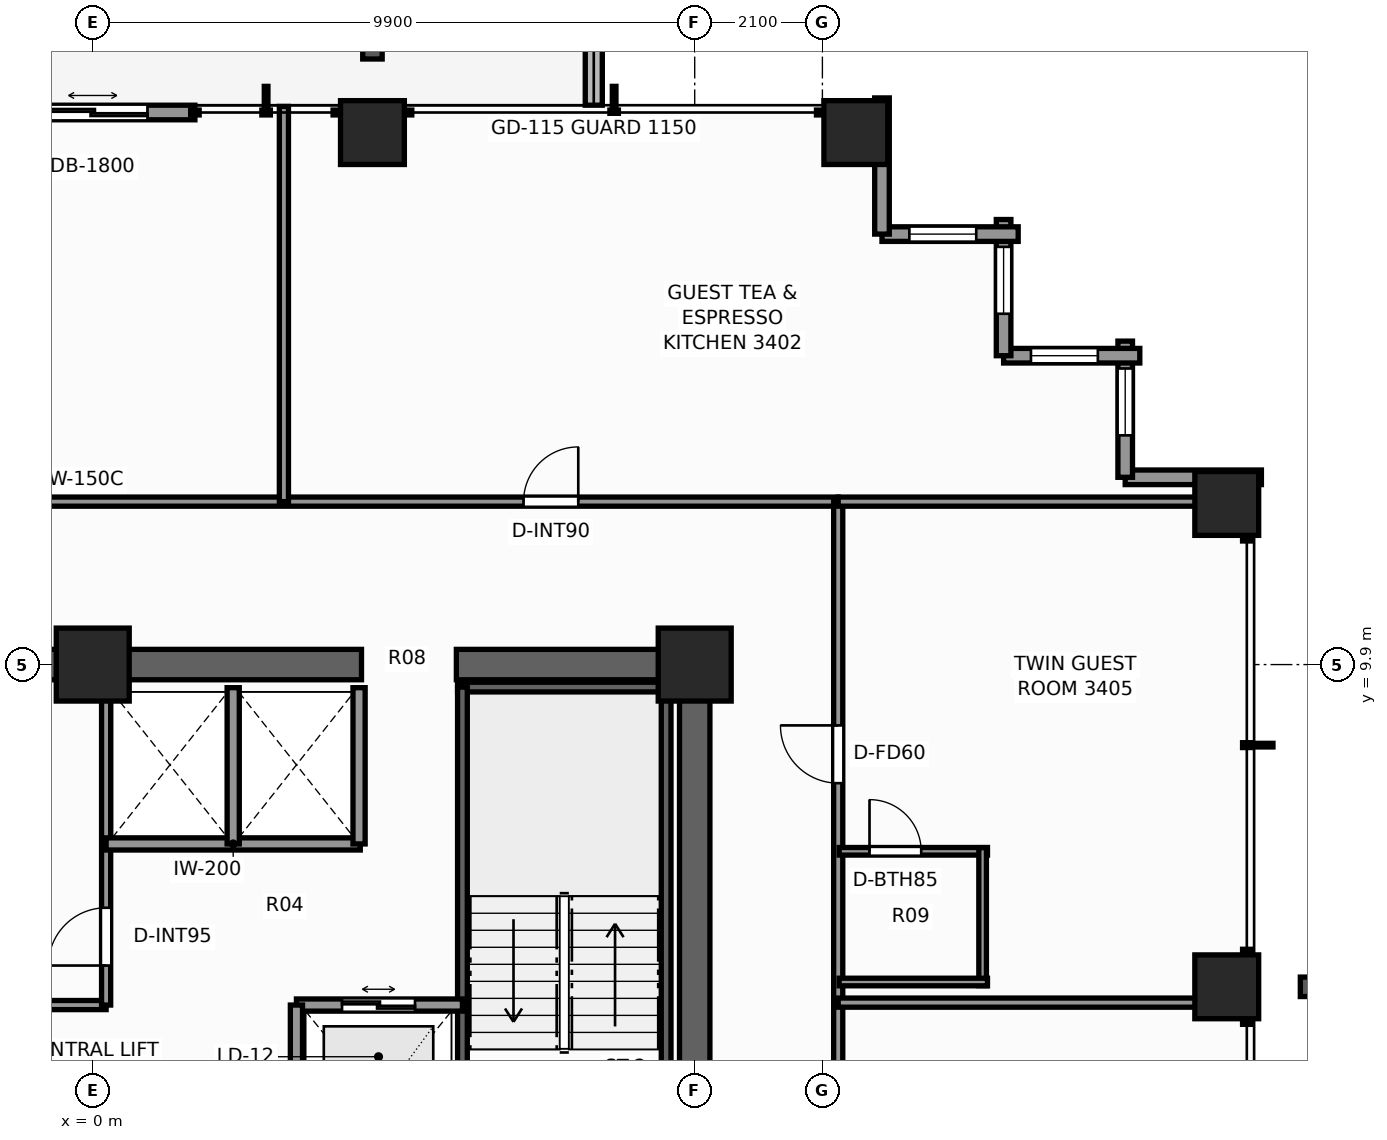
"""IFC4 building model, lengths in metres.
Left out: names, types, materials, properties, quantities, classifications, styles, units other than length and angle.
Written with IfcOpenShell. Run it as: python <this file> out.ifc"""

import sys

from ifc_helpers import new_model, si_unit, direction, frame, frame_2d, origin, origin_2d, place, context, subcontext, project, spatial, rectangle, extrude, element, fill, save


model = new_model("IFC4")
c1 = context("Model", 3, precision=1e-05, world=origin(), true_north=direction((0.0, 1.0)))
c2 = subcontext(c1, "Body", "Model", "MODEL_VIEW")
j1 = project(units=[si_unit("LENGTHUNIT", "METRE"), si_unit("PLANEANGLEUNIT", "RADIAN")], contexts=[c1])
p1 = place(None, origin())
s1 = spatial("IfcSite", under=j1, at=p1, CompositionType="ELEMENT")
p2 = place(p1, origin())
s2 = spatial("IfcBuilding", under=s1, at=p2, CompositionType="ELEMENT")
p3 = place(p2, frame((0.0, 0.0, 118.4)))
s3 = spatial("IfcBuildingStorey", under=s2, at=p3, CompositionType="ELEMENT", Elevation=118.4)
p4 = place(p3, frame((-10.15, 9.9, 0.0), z_axis=(0.0, 0.0, 1.0), x_axis=(1.0, 0.0, 0.0)))
e1 = element("IfcWall", 1, at=p4, inside=s3, PredefinedType="SHEAR", context=c2, shape_type="SweptSolid", body=[
    extrude(rectangle(XDim=14.57, YDim=0.5, at=frame_2d((7.285, 0.0))), origin(), (0.0, 0.0, 1.0), 3.3),
])
p5 = place(p3, frame((5.98, 9.9, 0.0), z_axis=(0.0, 0.0, 1.0), x_axis=(1.0, 0.0, 0.0)))
e2 = element("IfcWall", 2, at=p5, inside=s3, PredefinedType="SHEAR", context=c2, shape_type="SweptSolid", body=[
    extrude(rectangle(XDim=4.17, YDim=0.5, at=frame_2d((2.085, 0.0))), origin(), (0.0, 0.0, 1.0), 3.3),
])
p6 = place(p3, frame((9.9, -3.7, 0.0), z_axis=(0.0, 0.0, 1.0), x_axis=(0.0, 1.0, 0.0)))
e3 = element("IfcWall", 3, at=p6, inside=s3, PredefinedType="SHEAR", context=c2, shape_type="SweptSolid", body=[
    extrude(rectangle(XDim=13.35, YDim=0.5, at=frame_2d((6.675, 0.0))), origin(), (0.0, 0.0, 1.0), 3.3),
])
p7 = place(p6, frame((0.35, 0.0, 0.0)))
e4 = element("IfcOpeningElement", 4, at=p7, cuts=e3, PredefinedType="OPENING", context=c2, shape_type="SweptSolid", body=[
    extrude(rectangle(XDim=1.1, YDim=2.2, at=frame_2d((0.55, 1.1))), frame((0.0, 0.26, 0.0), z_axis=(0.0, -1.0, 0.0), x_axis=(1.0, 0.0, 0.0)), (0.0, 0.0, 1.0), 0.52),
])
for number, where, z_axis, x_axis in (
    (5, (9.9, 9.9, 0.0), (0.0, 0.0, 1.0), (1.0, 0.0, 0.0)),
    (6, (0.0, 9.9, 0.0), (0.0, 0.0, 1.0), (1.0, 0.0, 0.0)),
):
    element("IfcColumn", number, at=place(p3, frame(where, z_axis=z_axis, x_axis=x_axis)), inside=s3, PredefinedType="COLUMN", context=c2, shape_type="SweptSolid", body=[
        extrude(rectangle(XDim=1.2, YDim=1.2, at=origin_2d()), origin(), (0.0, 0.0, 1.0), 3.3),
    ])
for number, where, z_axis, x_axis in (
    (7, (4.6, 18.65, 0.0), (0.0, 0.0, 1.0), (1.0, 0.0, 0.0)),
    (8, (12.55, 18.65, 0.0), (0.0, 0.0, 1.0), (1.0, 0.0, 0.0)),
    (9, (18.65, 4.6, 0.0), (0.0, 0.0, 1.0), (1.0, 0.0, 0.0)),
    (10, (18.65, 12.55, 0.0), (0.0, 0.0, 1.0), (1.0, 0.0, 0.0)),
):
    element("IfcColumn", number, at=place(p3, frame(where, z_axis=z_axis, x_axis=x_axis)), inside=s3, PredefinedType="COLUMN", context=c2, shape_type="SweptSolid", body=[
        extrude(rectangle(XDim=1.05, YDim=1.05, at=origin_2d()), origin(), (0.0, 0.0, 1.0), 3.3),
    ])
p8 = place(p3, frame((8.24, 19.1, -0.04), z_axis=(0.0, 0.0, 1.0), x_axis=(0.0, 1.0, 0.0)))
e11 = element("IfcWall", 11, at=p8, inside=s3, PredefinedType="PARAPET", context=c2, shape_type="SweptSolid", body=[
    extrude(rectangle(XDim=1.705, YDim=0.28, at=frame_2d((0.853, 0.0))), origin(), (0.0, 0.0, 1.0), 0.42),
])
p9 = place(p3, frame((16.98, 12.98, 0.0), z_axis=(0.0, 0.0, 1.0), x_axis=(1.0, 0.0, 0.0)))
e12 = element("IfcWall", 12, at=p9, inside=s3, PredefinedType="STANDARD", context=c2, shape_type="SweptSolid", body=[
    extrude(rectangle(XDim=2.24, YDim=0.24, at=frame_2d((1.12, 0.0))), origin(), (0.0, 0.0, 1.0), 2.459),
])
p10 = place(p3, frame((16.98, 15.22, 0.0), z_axis=(0.0, 0.0, 1.0), x_axis=(0.0, -1.0, 0.0)))
e13 = element("IfcWall", 13, at=p10, inside=s3, PredefinedType="STANDARD", context=c2, shape_type="SweptSolid", body=[
    extrude(rectangle(XDim=2.24, YDim=0.24, at=frame_2d((1.12, 0.0))), origin(), (0.0, 0.0, 1.0), 2.459),
])
p11 = place(p10, frame((0.45, 0.0, 0.65)))
e14 = element("IfcOpeningElement", 14, at=p11, cuts=e13, PredefinedType="OPENING", context=c2, shape_type="SweptSolid", body=[
    extrude(rectangle(XDim=1.1, YDim=1.45, at=frame_2d((0.55, 0.725))), frame((0.0, 0.13, 0.0), z_axis=(0.0, -1.0, 0.0), x_axis=(1.0, 0.0, 0.0)), (0.0, 0.0, 1.0), 0.26),
])
p12 = place(p3, frame((14.98, 14.98, 0.0), z_axis=(0.0, 0.0, 1.0), x_axis=(1.0, 0.0, 0.0)))
e15 = element("IfcWall", 15, at=p12, inside=s3, PredefinedType="STANDARD", context=c2, shape_type="SweptSolid", body=[
    extrude(rectangle(XDim=2.24, YDim=0.24, at=frame_2d((1.12, 0.0))), origin(), (0.0, 0.0, 1.0), 2.459),
])
p13 = place(p12, frame((0.45, 0.0, 0.65)))
e16 = element("IfcOpeningElement", 16, at=p13, cuts=e15, PredefinedType="OPENING", context=c2, shape_type="SweptSolid", body=[
    extrude(rectangle(XDim=1.1, YDim=1.45, at=frame_2d((0.55, 0.725))), frame((0.0, 0.13, 0.0), z_axis=(0.0, -1.0, 0.0), x_axis=(1.0, 0.0, 0.0)), (0.0, 0.0, 1.0), 0.26),
])
p14 = place(p3, frame((14.98, 17.22, 0.0), z_axis=(0.0, 0.0, 1.0), x_axis=(0.0, -1.0, 0.0)))
e17 = element("IfcWall", 17, at=p14, inside=s3, PredefinedType="STANDARD", context=c2, shape_type="SweptSolid", body=[
    extrude(rectangle(XDim=2.24, YDim=0.24, at=frame_2d((1.12, 0.0))), origin(), (0.0, 0.0, 1.0), 2.459),
])
p15 = place(p14, frame((0.45, 0.0, 0.65)))
e18 = element("IfcOpeningElement", 18, at=p15, cuts=e17, PredefinedType="OPENING", context=c2, shape_type="SweptSolid", body=[
    extrude(rectangle(XDim=1.1, YDim=1.45, at=frame_2d((0.55, 0.725))), frame((0.0, 0.13, 0.0), z_axis=(0.0, -1.0, 0.0), x_axis=(1.0, 0.0, 0.0)), (0.0, 0.0, 1.0), 0.26),
])
p16 = place(p3, frame((12.98, 16.98, 0.0), z_axis=(0.0, 0.0, 1.0), x_axis=(1.0, 0.0, 0.0)))
e19 = element("IfcWall", 19, at=p16, inside=s3, PredefinedType="STANDARD", context=c2, shape_type="SweptSolid", body=[
    extrude(rectangle(XDim=2.24, YDim=0.24, at=frame_2d((1.12, 0.0))), origin(), (0.0, 0.0, 1.0), 2.459),
])
p17 = place(p16, frame((0.45, 0.0, 0.65)))
e20 = element("IfcOpeningElement", 20, at=p17, cuts=e19, PredefinedType="OPENING", context=c2, shape_type="SweptSolid", body=[
    extrude(rectangle(XDim=1.1, YDim=1.45, at=frame_2d((0.55, 0.725))), frame((0.0, 0.13, 0.0), z_axis=(0.0, -1.0, 0.0), x_axis=(1.0, 0.0, 0.0)), (0.0, 0.0, 1.0), 0.26),
])
p18 = place(p3, frame((12.98, 19.22, 0.0), z_axis=(0.0, 0.0, 1.0), x_axis=(0.0, -1.0, 0.0)))
e21 = element("IfcWall", 21, at=p18, inside=s3, PredefinedType="STANDARD", context=c2, shape_type="SweptSolid", body=[
    extrude(rectangle(XDim=2.24, YDim=0.24, at=frame_2d((1.12, 0.0))), origin(), (0.0, 0.0, 1.0), 2.459),
])
p19 = place(p3, frame((-1.68, 18.98, 0.0), z_axis=(0.0, 0.0, 1.0), x_axis=(1.0, 0.0, 0.0)))
e22 = element("IfcWall", 22, at=p19, inside=s3, PredefinedType="STANDARD", context=c2, shape_type="SweptSolid", body=[
    extrude(rectangle(XDim=3.36, YDim=0.24, at=frame_2d((1.68, 0.0))), origin(), (0.0, 0.0, 1.0), 3.08),
])
p20 = place(p19, frame((0.78, 0.0, 0.0)))
e23 = element("IfcOpeningElement", 23, at=p20, cuts=e22, PredefinedType="OPENING", context=c2, shape_type="SweptSolid", body=[
    extrude(rectangle(XDim=1.8, YDim=2.2, at=frame_2d((0.9, 1.1))), frame((0.0, 0.13, 0.0), z_axis=(0.0, -1.0, 0.0), x_axis=(1.0, 0.0, 0.0)), (0.0, 0.0, 1.0), 0.26),
])
p21 = place(p3, frame((6.0, 9.53, 0.0), z_axis=(0.0, 0.0, 1.0), x_axis=(1.0, 0.0, 0.0)))
e24 = element("IfcWall", 24, at=p21, inside=s3, PredefinedType="SHEAR", context=c2, shape_type="SweptSolid", body=[
    extrude(rectangle(XDim=3.52, YDim=0.16, at=frame_2d((1.76, 0.0))), origin(), (0.0, 0.0, 1.0), 3.3),
])
for number, where, z_axis, x_axis in (
    (25, (6.08, 1.97, 0.0), (0.0, 0.0, 1.0), (0.0, 1.0, 0.0)),
    (26, (9.43, 1.97, 0.0), (0.0, 0.0, 1.0), (0.0, 1.0, 0.0)),
):
    element("IfcWall", number, at=place(p3, frame(where, z_axis=z_axis, x_axis=x_axis)), inside=s3, PredefinedType="SHEAR", context=c2, shape_type="SweptSolid", body=[
        extrude(rectangle(XDim=7.56, YDim=0.16, at=frame_2d((3.78, 0.0))), origin(), (0.0, 0.0, 1.0), 3.3),
    ])
p22 = place(p3, frame((3.35, 4.3, 0.0), z_axis=(0.0, 0.0, 1.0), x_axis=(1.0, 0.0, 0.0)))
e27 = element("IfcWall", 27, at=p22, inside=s3, PredefinedType="SOLIDWALL", context=c2, shape_type="SweptSolid", body=[
    extrude(rectangle(XDim=2.73, YDim=0.2, at=frame_2d((1.365, 0.0))), origin(), (0.0, 0.0, 1.0), 3.08),
])
p23 = place(p22, frame((0.75, 0.0, 0.0)))
e28 = element("IfcOpeningElement", 28, at=p23, cuts=e27, PredefinedType="OPENING", context=c2, shape_type="SweptSolid", body=[
    extrude(rectangle(XDim=1.2, YDim=2.25, at=frame_2d((0.6, 1.125))), frame((0.0, 0.11, 0.0), z_axis=(0.0, -1.0, 0.0), x_axis=(1.0, 0.0, 0.0)), (0.0, 0.0, 1.0), 0.22),
])
p24 = place(p3, frame((3.35, 1.1, 0.0), z_axis=(0.0, 0.0, 1.0), x_axis=(0.0, 1.0, 0.0)))
e29 = element("IfcWall", 29, at=p24, inside=s3, PredefinedType="SOLIDWALL", context=c2, shape_type="SweptSolid", body=[
    extrude(rectangle(XDim=3.2, YDim=0.2, at=frame_2d((1.6, 0.0))), origin(), (0.0, 0.0, 1.0), 2.715),
])
p25 = place(p3, frame((-6.08, 4.3, 0.0), z_axis=(0.0, 0.0, 1.0), x_axis=(1.0, 0.0, 0.0)))
e30 = element("IfcWall", 30, at=p25, inside=s3, PredefinedType="PARTITIONING", context=c2, shape_type="SweptSolid", body=[
    extrude(rectangle(XDim=6.3, YDim=0.15, at=frame_2d((3.15, 0.0))), origin(), (0.0, 0.0, 1.0), 3.08),
])
p26 = place(p3, frame((0.22, 4.3, 0.0), z_axis=(0.0, 0.0, 1.0), x_axis=(0.0, 1.0, 0.0)))
e31 = element("IfcWall", 31, at=p26, inside=s3, PredefinedType="PARTITIONING", context=c2, shape_type="SweptSolid", body=[
    extrude(rectangle(XDim=5.22, YDim=0.15, at=frame_2d((2.61, 0.0))), origin(), (0.0, 0.0, 1.0), 3.08),
])
p27 = place(p26, frame((0.65, 0.0, 0.0)))
e32 = element("IfcOpeningElement", 32, at=p27, cuts=e31, PredefinedType="OPENING", context=c2, shape_type="SweptSolid", body=[
    extrude(rectangle(XDim=0.95, YDim=2.06, at=frame_2d((0.475, 1.03))), frame((0.0, 0.085, 0.0), z_axis=(0.0, -1.0, 0.0), x_axis=(1.0, 0.0, 0.0)), (0.0, 0.0, 1.0), 0.17),
])
p28 = place(p3, frame((0.22, 6.95, 0.0), z_axis=(0.0, 0.0, 1.0), x_axis=(1.0, 0.0, 0.0)))
e33 = element("IfcWall", 33, at=p28, inside=s3, PredefinedType="SOLIDWALL", context=c2, shape_type="SweptSolid", body=[
    extrude(rectangle(XDim=4.18, YDim=0.2, at=frame_2d((2.09, 0.0))), origin(), (0.0, 0.0, 1.0), 3.08),
])
for number, where, z_axis, x_axis in (
    (34, (4.38, 6.95, 0.0), (0.0, 0.0, 1.0), (0.0, 1.0, 0.0)),
    (35, (2.31, 6.95, 0.0), (0.0, 0.0, 1.0), (0.0, 1.0, 0.0)),
):
    element("IfcWall", number, at=place(p3, frame(where, z_axis=z_axis, x_axis=x_axis)), inside=s3, PredefinedType="SOLIDWALL", context=c2, shape_type="SweptSolid", body=[
        extrude(rectangle(XDim=2.57, YDim=0.2, at=frame_2d((1.285, 0.0))), origin(), (0.0, 0.0, 1.0), 3.08),
    ])
p29 = place(p3, frame((-12.58, 12.58, 0.0), z_axis=(0.0, 0.0, 1.0), x_axis=(1.0, 0.0, 0.0)))
e36 = element("IfcWall", 36, at=p29, inside=s3, PredefinedType="PARTITIONING", context=c2, shape_type="SweptSolid", body=[
    extrude(rectangle(XDim=24.84, YDim=0.15, at=frame_2d((12.42, 0.0))), origin(), (0.0, 0.0, 1.0), 2.292),
])
p30 = place(p29, frame((4.595, 0.0, 0.0)))
e37 = element("IfcOpeningElement", 37, at=p30, cuts=e36, PredefinedType="OPENING", context=c2, shape_type="SweptSolid", body=[
    extrude(rectangle(XDim=0.9, YDim=2.06, at=frame_2d((0.45, 1.03))), frame((0.0, 0.085, 0.0), z_axis=(0.0, -1.0, 0.0), x_axis=(1.0, 0.0, 0.0)), (0.0, 0.0, 1.0), 0.17),
])
p31 = place(p29, frame((19.665, 0.0, 0.0)))
e38 = element("IfcOpeningElement", 38, at=p31, cuts=e36, PredefinedType="OPENING", context=c2, shape_type="SweptSolid", body=[
    extrude(rectangle(XDim=0.9, YDim=2.06, at=frame_2d((0.45, 1.03))), frame((0.0, 0.085, 0.0), z_axis=(0.0, -1.0, 0.0), x_axis=(1.0, 0.0, 0.0)), (0.0, 0.0, 1.0), 0.17),
])
p32 = place(p3, frame((12.26, -12.26, 0.0), z_axis=(0.0, 0.0, 1.0), x_axis=(0.0, 1.0, 0.0)))
e39 = element("IfcWall", 39, at=p32, inside=s3, PredefinedType="PARTITIONING", context=c2, shape_type="SweptSolid", body=[
    extrude(rectangle(XDim=24.84, YDim=0.15, at=frame_2d((12.42, 0.0))), origin(), (0.0, 0.0, 1.0), 2.292),
])
p33 = place(p32, frame((3.721, 0.0, 0.0)))
e40 = element("IfcOpeningElement", 40, at=p33, cuts=e39, PredefinedType="OPENING", context=c2, shape_type="SweptSolid", body=[
    extrude(rectangle(XDim=0.9, YDim=2.06, at=frame_2d((0.45, 1.03))), frame((0.0, 0.085, 0.0), z_axis=(0.0, -1.0, 0.0), x_axis=(1.0, 0.0, 0.0)), (0.0, 0.0, 1.0), 0.17),
])
p34 = place(p32, frame((9.78, 0.0, 0.0)))
e41 = element("IfcOpeningElement", 41, at=p34, cuts=e39, PredefinedType="OPENING", context=c2, shape_type="SweptSolid", body=[
    extrude(rectangle(XDim=0.9, YDim=2.06, at=frame_2d((0.45, 1.03))), frame((0.0, 0.085, 0.0), z_axis=(0.0, -1.0, 0.0), x_axis=(1.0, 0.0, 0.0)), (0.0, 0.0, 1.0), 0.17),
])
p35 = place(p32, frame((20.209, 0.0, 0.0)))
e42 = element("IfcOpeningElement", 42, at=p35, cuts=e39, PredefinedType="OPENING", context=c2, shape_type="SweptSolid", body=[
    extrude(rectangle(XDim=0.95, YDim=2.06, at=frame_2d((0.475, 1.03))), frame((0.0, 0.085, 0.0), z_axis=(0.0, -1.0, 0.0), x_axis=(1.0, 0.0, 0.0)), (0.0, 0.0, 1.0), 0.17),
])
p36 = place(p3, frame((12.26, 12.58, 0.0), z_axis=(0.0, 0.0, 1.0), x_axis=(1.0, 0.0, 0.0)))
e43 = element("IfcWall", 43, at=p36, inside=s3, PredefinedType="PARTITIONING", context=c2, shape_type="SweptSolid", body=[
    extrude(rectangle(XDim=6.82, YDim=0.15, at=frame_2d((3.41, 0.0))), origin(), (0.0, 0.0, 1.0), 2.292),
])
p37 = place(p3, frame((3.144, 12.58, 0.0), z_axis=(0.0, 0.0, 1.0), x_axis=(0.0, 1.0, 0.0)))
e44 = element("IfcWall", 44, at=p37, inside=s3, PredefinedType="PARTITIONING", context=c2, shape_type="SweptSolid", body=[
    extrude(rectangle(XDim=6.5, YDim=0.15, at=frame_2d((3.25, 0.0))), origin(), (0.0, 0.0, 1.0), 2.449),
])
p38 = place(p3, frame((12.26, 4.34, 0.0), z_axis=(0.0, 0.0, 1.0), x_axis=(1.0, 0.0, 0.0)))
e45 = element("IfcWall", 45, at=p38, inside=s3, PredefinedType="PARTITIONING", context=c2, shape_type="SweptSolid", body=[
    extrude(rectangle(XDim=6.82, YDim=0.15, at=frame_2d((3.41, 0.0))), origin(), (0.0, 0.0, 1.0), 2.292),
])
p39 = place(p3, frame((12.275, 6.829, 0.0), z_axis=(0.0, 0.0, 1.0), x_axis=(1.0, 0.0, 0.0)))
e46 = element("IfcWall", 46, at=p39, inside=s3, PredefinedType="PARTITIONING", context=c2, shape_type="SweptSolid", body=[
    extrude(rectangle(XDim=2.44, YDim=0.125, at=frame_2d((1.22, 0.0))), origin(), (0.0, 0.0, 1.0), 3.08),
])
p40 = place(p39, frame((0.5, 0.0, 0.0)))
e47 = element("IfcOpeningElement", 47, at=p40, cuts=e46, PredefinedType="OPENING", context=c2, shape_type="SweptSolid", body=[
    extrude(rectangle(XDim=0.85, YDim=2.03, at=frame_2d((0.425, 1.015))), frame((0.0, 0.073, 0.0), z_axis=(0.0, -1.0, 0.0), x_axis=(1.0, 0.0, 0.0)), (0.0, 0.0, 1.0), 0.145),
])
p41 = place(p3, frame((14.635, 4.619, 0.0), z_axis=(0.0, 0.0, 1.0), x_axis=(0.0, 1.0, 0.0)))
e48 = element("IfcWall", 48, at=p41, inside=s3, PredefinedType="PARTITIONING", context=c2, shape_type="SweptSolid", body=[
    extrude(rectangle(XDim=2.27, YDim=0.125, at=frame_2d((1.135, 0.0))), origin(), (0.0, 0.0, 1.0), 2.292),
])
p42 = place(p3, frame((12.275, 4.679, 0.0), z_axis=(0.0, 0.0, 1.0), x_axis=(1.0, 0.0, 0.0)))
e49 = element("IfcWall", 49, at=p42, inside=s3, PredefinedType="PARTITIONING", context=c2, shape_type="SweptSolid", body=[
    extrude(rectangle(XDim=2.44, YDim=0.125, at=frame_2d((1.22, 0.0))), origin(), (0.0, 0.0, 1.0), 2.292),
])
p43 = place(p11, origin())
e50 = element("IfcWindow", 50, at=p43, inside=s3, PartitioningType="SINGLE_PANEL", PredefinedType="WINDOW", context=c2, shape_type="SweptSolid", body=[
    extrude(rectangle(XDim=1.1, YDim=1.45, at=frame_2d((0.55, 0.725))), frame((0.0, 0.03, 0.0), z_axis=(0.0, -1.0, 0.0), x_axis=(1.0, 0.0, 0.0)), (0.0, 0.0, 1.0), 0.06),
])
fill(e14, e50)
p44 = place(p13, origin())
e51 = element("IfcWindow", 51, at=p44, inside=s3, PartitioningType="SINGLE_PANEL", PredefinedType="WINDOW", context=c2, shape_type="SweptSolid", body=[
    extrude(rectangle(XDim=1.1, YDim=1.45, at=frame_2d((0.55, 0.725))), frame((0.0, 0.03, 0.0), z_axis=(0.0, -1.0, 0.0), x_axis=(1.0, 0.0, 0.0)), (0.0, 0.0, 1.0), 0.06),
])
fill(e16, e51)
p45 = place(p15, origin())
e52 = element("IfcWindow", 52, at=p45, inside=s3, PartitioningType="SINGLE_PANEL", PredefinedType="WINDOW", context=c2, shape_type="SweptSolid", body=[
    extrude(rectangle(XDim=1.1, YDim=1.45, at=frame_2d((0.55, 0.725))), frame((0.0, 0.03, 0.0), z_axis=(0.0, -1.0, 0.0), x_axis=(1.0, 0.0, 0.0)), (0.0, 0.0, 1.0), 0.06),
])
fill(e18, e52)
p46 = place(p17, origin())
e53 = element("IfcWindow", 53, at=p46, inside=s3, PartitioningType="SINGLE_PANEL", PredefinedType="WINDOW", context=c2, shape_type="SweptSolid", body=[
    extrude(rectangle(XDim=1.1, YDim=1.45, at=frame_2d((0.55, 0.725))), frame((0.0, 0.03, 0.0), z_axis=(0.0, -1.0, 0.0), x_axis=(1.0, 0.0, 0.0)), (0.0, 0.0, 1.0), 0.06),
])
fill(e20, e53)
p47 = place(p20, origin())
e54 = element("IfcDoor", 54, at=p47, inside=s3, OperationType="DOUBLE_DOOR_SLIDING", PredefinedType="DOOR", context=c2, shape_type="SweptSolid", body=[
    extrude(rectangle(XDim=1.8, YDim=2.2, at=frame_2d((0.9, 1.1))), frame((0.0, 0.025, 0.0), z_axis=(0.0, -1.0, 0.0), x_axis=(1.0, 0.0, 0.0)), (0.0, 0.0, 1.0), 0.05),
])
fill(e23, e54)
p48 = place(p23, origin())
e55 = element("IfcDoor", 55, at=p48, inside=s3, OperationType="DOUBLE_DOOR_SLIDING", PredefinedType="DOOR", context=c2, shape_type="SweptSolid", body=[
    extrude(rectangle(XDim=1.2, YDim=2.25, at=frame_2d((0.6, 1.125))), frame((0.0, 0.025, 0.0), z_axis=(0.0, -1.0, 0.0), x_axis=(1.0, 0.0, 0.0)), (0.0, 0.0, 1.0), 0.05),
])
fill(e28, e55)
p49 = place(p27, origin())
e56 = element("IfcDoor", 56, at=p49, inside=s3, OperationType="SINGLE_SWING_LEFT", PredefinedType="DOOR", context=c2, shape_type="SweptSolid", body=[
    extrude(rectangle(XDim=0.95, YDim=2.06, at=frame_2d((0.475, 1.03))), frame((0.0, 0.025, 0.0), z_axis=(0.0, -1.0, 0.0), x_axis=(1.0, 0.0, 0.0)), (0.0, 0.0, 1.0), 0.05),
])
fill(e32, e56)
p50 = place(p31, origin())
e57 = element("IfcDoor", 57, at=p50, inside=s3, OperationType="SINGLE_SWING_RIGHT", PredefinedType="DOOR", context=c2, shape_type="SweptSolid", body=[
    extrude(rectangle(XDim=0.9, YDim=2.06, at=frame_2d((0.45, 1.03))), frame((0.0, 0.025, 0.0), z_axis=(0.0, -1.0, 0.0), x_axis=(1.0, 0.0, 0.0)), (0.0, 0.0, 1.0), 0.05),
])
fill(e38, e57)
p51 = place(p40, origin())
e58 = element("IfcDoor", 58, at=p51, inside=s3, OperationType="SINGLE_SWING_LEFT", PredefinedType="DOOR", context=c2, shape_type="SweptSolid", body=[
    extrude(rectangle(XDim=0.85, YDim=2.03, at=frame_2d((0.425, 1.015))), frame((0.0, 0.025, 0.0), z_axis=(0.0, -1.0, 0.0), x_axis=(1.0, 0.0, 0.0)), (0.0, 0.0, 1.0), 0.05),
])
fill(e47, e58)
p52 = place(p35, origin())
e59 = element("IfcDoor", 59, at=p52, inside=s3, OperationType="SINGLE_SWING_RIGHT", PredefinedType="DOOR", context=c2, shape_type="SweptSolid", body=[
    extrude(rectangle(XDim=0.95, YDim=2.06, at=frame_2d((0.475, 1.03))), frame((0.0, 0.025, 0.0), z_axis=(0.0, -1.0, 0.0), x_axis=(1.0, 0.0, 0.0)), (0.0, 0.0, 1.0), 0.05),
])
fill(e42, e59)
save(model, sys.argv[1])
